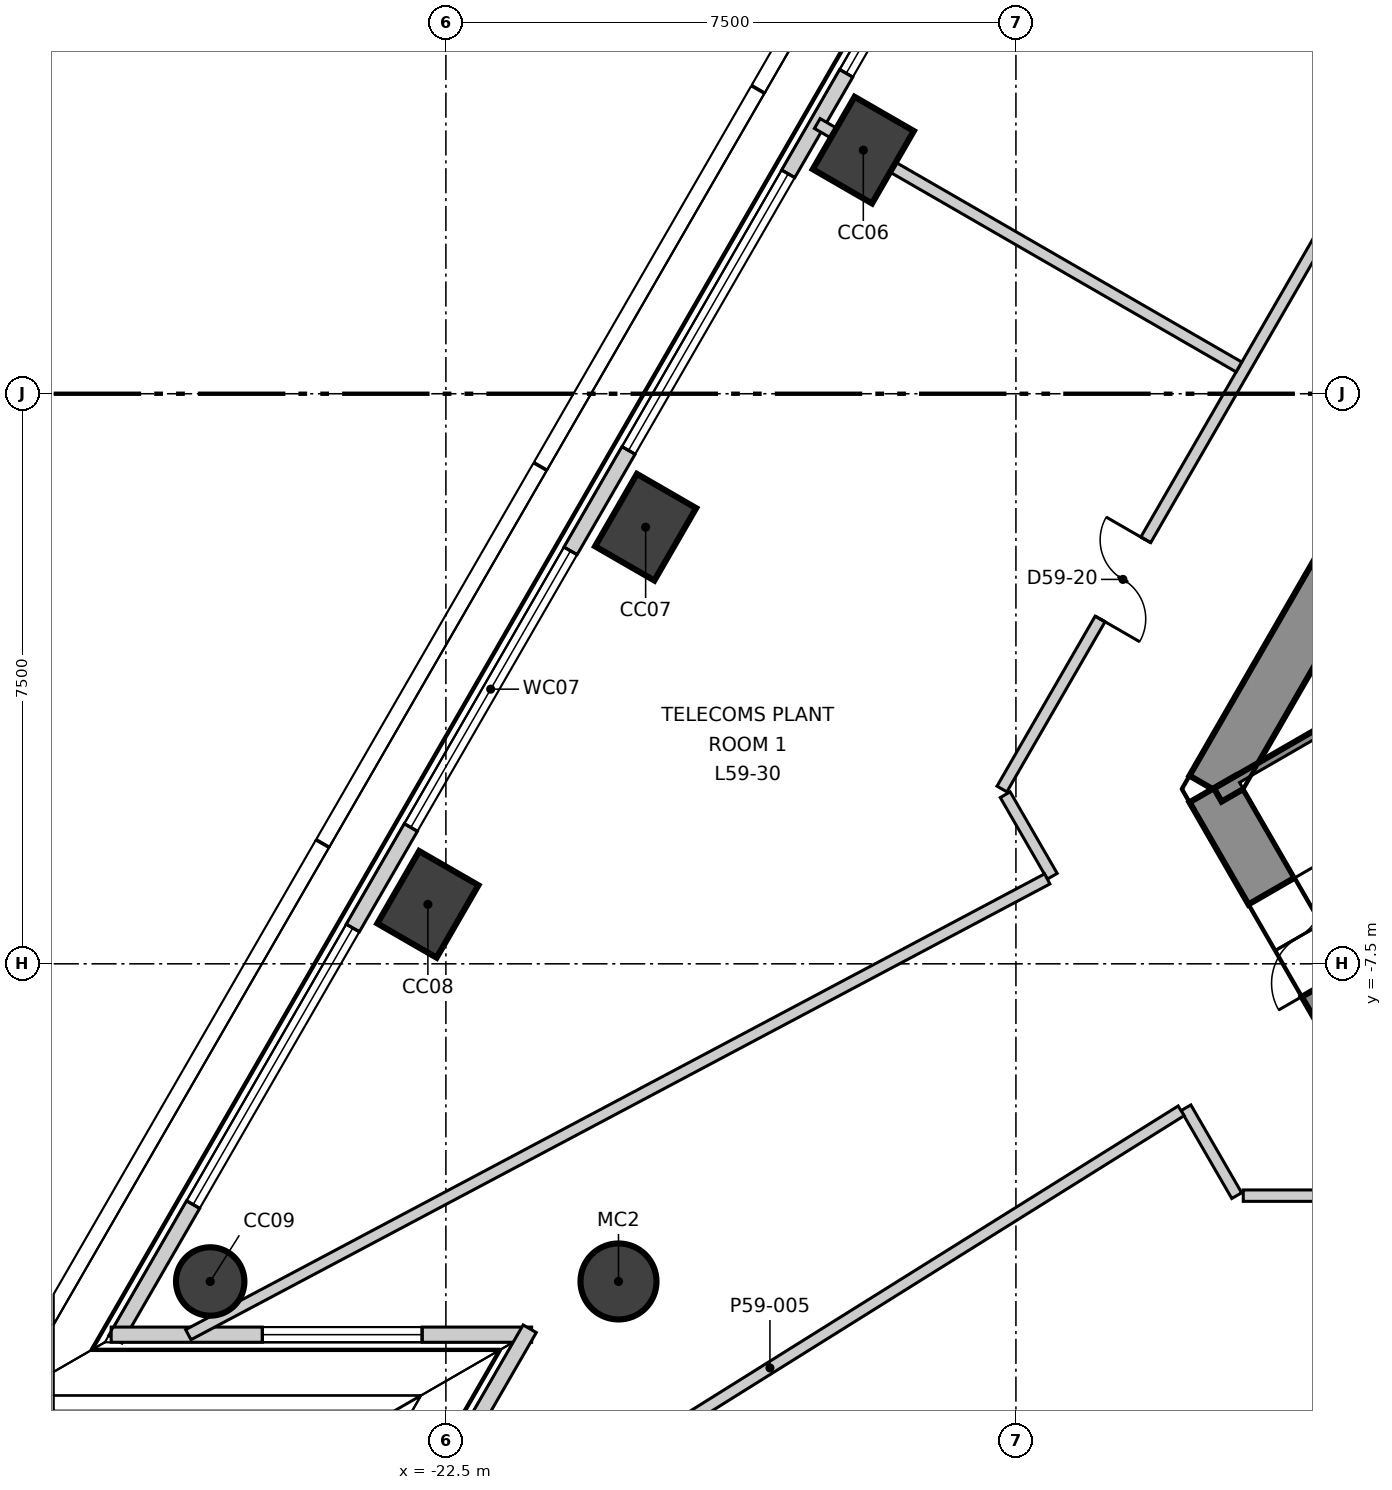
"""IFC4 building model, lengths in metres.
Left out: names, types, materials, properties, quantities, classifications, styles, units other than length and angle.
Written with IfcOpenShell. Run it as: python <this file> out.ifc"""

import sys

from ifc_helpers import new_model, si_unit, direction, frame, frame_2d, origin, origin_2d, place, context, subcontext, project, spatial, polyline, rectangle, circle, outline, extrude, element, fill, save


model = new_model("IFC4")
c1 = context("Model", 3, precision=1e-05, world=origin(), true_north=direction((0.0, 1.0)))
c2 = subcontext(c1, "Body", "Model", "MODEL_VIEW")
j1 = project(units=[si_unit("LENGTHUNIT", "METRE"), si_unit("PLANEANGLEUNIT", "RADIAN")], contexts=[c1])
p1 = place(None, origin())
s1 = spatial("IfcSite", under=j1, at=p1, CompositionType="ELEMENT")
p2 = place(p1, origin())
s2 = spatial("IfcBuilding", under=s1, at=p2, CompositionType="ELEMENT")
p3 = place(p2, frame((0.0, 0.0, 251.3)))
s3 = spatial("IfcBuildingStorey", under=s2, at=p3, CompositionType="ELEMENT", Elevation=251.3)
p4 = place(p3, frame((-1.703, 13.35, -0.3), z_axis=(0.0, 0.0, 1.0), x_axis=(-0.500011533395, -0.866018744874, 0.0)))
e1 = element("IfcWall", 1, at=p4, inside=s3, PredefinedType="SHEAR", context=c2, shape_type="SweptSolid", body=[
    extrude(outline(polyline([(-0.202, -0.35), (1.782, -0.35), (3.766, -0.35), (5.75, -0.35), (7.734, -0.35), (9.718, -0.35), (11.702, -0.35), (13.686, -0.35), (15.67, -0.35), (17.654, -0.35), (19.638, -0.35), (21.622, -0.35), (21.218, 0.35), (19.307, 0.35), (17.397, 0.35), (15.486, 0.35), (13.576, 0.35), (11.665, 0.35), (9.755, 0.35), (7.844, 0.35), (5.934, 0.35), (4.023, 0.35), (2.113, 0.35), (0.202, 0.35), (-0.202, -0.35)])), origin(), (0.0, 0.0, 1.0), 4.2),
])
p5 = place(p4, frame((10.16, 0.0, 0.3)))
e2 = element("IfcOpeningElement", 2, at=p5, cuts=e1, PredefinedType="OPENING", context=c2, shape_type="SweptSolid", body=[
    extrude(rectangle(XDim=1.1, YDim=2.1, at=frame_2d((0.55, 1.05))), frame((0.0, 0.36, 0.0), z_axis=(0.0, -1.0, 0.0), x_axis=(1.0, 0.0, 0.0)), (0.0, 0.0, 1.0), 0.72),
])
p6 = place(p3, frame((-12.413, -5.2, -0.3), z_axis=(0.0, 0.0, 1.0), x_axis=(0.49999337185, -0.866029230515, 0.0)))
e3 = element("IfcWall", 3, at=p6, inside=s3, PredefinedType="SHEAR", context=c2, shape_type="SweptSolid", body=[
    extrude(outline(polyline([(-0.202, -0.35), (1.703, -0.35), (3.608, -0.35), (3.204, 0.35), (1.703, 0.35), (0.202, 0.35), (-0.202, -0.35)])), origin(), (0.0, 0.0, 1.0), 4.2),
])
p7 = place(p6, frame((1.553, 0.0, 0.3)))
e4 = element("IfcOpeningElement", 4, at=p7, cuts=e3, PredefinedType="OPENING", context=c2, shape_type="SweptSolid", body=[
    extrude(rectangle(XDim=1.4, YDim=2.1, at=frame_2d((0.7, 1.05))), frame((0.0, 0.36, 0.0), z_axis=(0.0, -1.0, 0.0), x_axis=(1.0, 0.0, 0.0)), (0.0, 0.0, 1.0), 0.72),
])
for number, where, z_axis, x_axis in (
    (5, (-17.008, 3.205, -0.3), (0.0, 0.0, 1.0), (0.5, 0.866, 0.0)),
    (6, (-19.872, -1.756, -0.3), (0.0, 0.0, 1.0), (0.5, 0.866, 0.0)),
    (7, (-22.737, -6.718, -0.3), (0.0, 0.0, 1.0), (0.5, 0.866, 0.0)),
):
    element("IfcColumn", number, at=place(p3, frame(where, z_axis=z_axis, x_axis=x_axis)), inside=s3, PredefinedType="COLUMN", context=c2, shape_type="SweptSolid", body=[
        extrude(rectangle(XDim=1.1, YDim=0.9, at=origin_2d()), origin(), (0.0, 0.0, 1.0), 4.2),
    ])
p8 = place(p3, frame((-25.601, -11.679, -0.3), z_axis=(0.0, 0.0, 1.0), x_axis=(0.5, 0.866025403784, 0.0)))
e8 = element("IfcColumn", 8, at=p8, inside=s3, PredefinedType="COLUMN", context=c2, shape_type="SweptSolid", body=[
    extrude(circle(Radius=0.45, at=origin_2d()), origin(), (0.0, 0.0, 1.0), 4.2),
])
p9 = place(p3, frame((-20.229, -11.679, -0.3), z_axis=(0.0, 0.0, 1.0), x_axis=(1.0, 0.0, 0.0)))
e9 = element("IfcColumn", 9, at=p9, inside=s3, PredefinedType="COLUMN", context=c2, shape_type="SweptSolid", body=[
    extrude(circle(Radius=0.5, at=origin_2d()), origin(), (0.0, 0.0, 1.0), 4.2),
])
p10 = place(p3, frame((-2.641, 29.489, 0.0), z_axis=(0.0, 0.0, 1.0), x_axis=(-0.500004868955, -0.866022592674, 0.0)))
e10 = element("IfcWall", 10, at=p10, inside=s3, PredefinedType="ELEMENTEDWALL", context=c2, shape_type="SweptSolid", body=[
    extrude(rectangle(XDim=48.416, YDim=0.2, at=frame_2d((24.208, 0.0))), origin(), (0.0, 0.0, 1.0), 3.9),
])
p11 = place(p10, frame((2.067, 0.0, 0.9)))
e11 = element("IfcOpeningElement", 11, at=p11, cuts=e10, PredefinedType="OPENING", context=c2, shape_type="SweptSolid", body=[
    extrude(rectangle(XDim=4.2, YDim=2.5, at=frame_2d((2.1, 1.25))), frame((0.0, 0.11, 0.0), z_axis=(0.0, -1.0, 0.0), x_axis=(1.0, 0.0, 0.0)), (0.0, 0.0, 1.0), 0.22),
])
p12 = place(p10, frame((7.796, 0.0, 0.9)))
e12 = element("IfcOpeningElement", 12, at=p12, cuts=e10, PredefinedType="OPENING", context=c2, shape_type="SweptSolid", body=[
    extrude(rectangle(XDim=4.2, YDim=2.5, at=frame_2d((2.1, 1.25))), frame((0.0, 0.11, 0.0), z_axis=(0.0, -1.0, 0.0), x_axis=(1.0, 0.0, 0.0)), (0.0, 0.0, 1.0), 0.22),
])
p13 = place(p10, frame((13.524, 0.0, 0.9)))
e13 = element("IfcOpeningElement", 13, at=p13, cuts=e10, PredefinedType="OPENING", context=c2, shape_type="SweptSolid", body=[
    extrude(rectangle(XDim=4.2, YDim=2.5, at=frame_2d((2.1, 1.25))), frame((0.0, 0.11, 0.0), z_axis=(0.0, -1.0, 0.0), x_axis=(1.0, 0.0, 0.0)), (0.0, 0.0, 1.0), 0.22),
])
p14 = place(p10, frame((19.253, 0.0, 0.9)))
e14 = element("IfcOpeningElement", 14, at=p14, cuts=e10, PredefinedType="OPENING", context=c2, shape_type="SweptSolid", body=[
    extrude(rectangle(XDim=4.2, YDim=2.5, at=frame_2d((2.1, 1.25))), frame((0.0, 0.11, 0.0), z_axis=(0.0, -1.0, 0.0), x_axis=(1.0, 0.0, 0.0)), (0.0, 0.0, 1.0), 0.22),
])
p15 = place(p10, frame((24.982, 0.0, 0.9)))
e15 = element("IfcOpeningElement", 15, at=p15, cuts=e10, PredefinedType="OPENING", context=c2, shape_type="SweptSolid", body=[
    extrude(rectangle(XDim=4.2, YDim=2.5, at=frame_2d((2.1, 1.25))), frame((0.0, 0.11, 0.0), z_axis=(0.0, -1.0, 0.0), x_axis=(1.0, 0.0, 0.0)), (0.0, 0.0, 1.0), 0.22),
])
p16 = place(p10, frame((30.711, 0.0, 0.9)))
e16 = element("IfcOpeningElement", 16, at=p16, cuts=e10, PredefinedType="OPENING", context=c2, shape_type="SweptSolid", body=[
    extrude(rectangle(XDim=4.2, YDim=2.5, at=frame_2d((2.1, 1.25))), frame((0.0, 0.11, 0.0), z_axis=(0.0, -1.0, 0.0), x_axis=(1.0, 0.0, 0.0)), (0.0, 0.0, 1.0), 0.22),
])
p17 = place(p10, frame((36.439, 0.0, 0.9)))
e17 = element("IfcOpeningElement", 17, at=p17, cuts=e10, PredefinedType="OPENING", context=c2, shape_type="SweptSolid", body=[
    extrude(rectangle(XDim=4.2, YDim=2.5, at=frame_2d((2.1, 1.25))), frame((0.0, 0.11, 0.0), z_axis=(0.0, -1.0, 0.0), x_axis=(1.0, 0.0, 0.0)), (0.0, 0.0, 1.0), 0.22),
])
p18 = place(p10, frame((42.168, 0.0, 0.9)))
e18 = element("IfcOpeningElement", 18, at=p18, cuts=e10, PredefinedType="OPENING", context=c2, shape_type="SweptSolid", body=[
    extrude(rectangle(XDim=4.2, YDim=2.5, at=frame_2d((2.1, 1.25))), frame((0.0, 0.11, 0.0), z_axis=(0.0, -1.0, 0.0), x_axis=(1.0, 0.0, 0.0)), (0.0, 0.0, 1.0), 0.22),
])
p19 = place(p3, frame((-26.904, -12.379, 0.0), z_axis=(0.0, 0.0, 1.0), x_axis=(1.0, 0.0, 0.0)))
e19 = element("IfcWall", 19, at=p19, inside=s3, PredefinedType="ELEMENTEDWALL", context=c2, shape_type="SweptSolid", body=[
    extrude(rectangle(XDim=5.532, YDim=0.2, at=frame_2d((2.766, 0.0))), origin(), (0.0, 0.0, 1.0), 3.9),
])
p20 = place(p19, frame((1.99, 0.0, 0.9)))
e20 = element("IfcOpeningElement", 20, at=p20, cuts=e19, PredefinedType="OPENING", context=c2, shape_type="SweptSolid", body=[
    extrude(rectangle(XDim=2.1, YDim=2.5, at=frame_2d((1.05, 1.25))), frame((0.0, 0.11, 0.0), z_axis=(0.0, -1.0, 0.0), x_axis=(1.0, 0.0, 0.0)), (0.0, 0.0, 1.0), 0.22),
])
p21 = place(p3, frame((-21.397, -12.301, 0.0), z_axis=(0.0, 0.0, 1.0), x_axis=(-0.499926164748, -0.866068028391, 0.0)))
e21 = element("IfcWall", 21, at=p21, inside=s3, PredefinedType="ELEMENTEDWALL", context=c2, shape_type="SweptSolid", body=[
    extrude(rectangle(XDim=5.533, YDim=0.2, at=frame_2d((2.767, 0.0))), origin(), (0.0, 0.0, 1.0), 3.9),
])
p22 = place(p21, frame((1.39, 0.0, 0.9)))
e22 = element("IfcOpeningElement", 22, at=p22, cuts=e21, PredefinedType="OPENING", context=c2, shape_type="SweptSolid", body=[
    extrude(rectangle(XDim=2.1, YDim=2.5, at=frame_2d((1.05, 1.25))), frame((0.0, 0.11, 0.0), z_axis=(0.0, -1.0, 0.0), x_axis=(1.0, 0.0, 0.0)), (0.0, 0.0, 1.0), 0.22),
])
p23 = place(p3, frame((-15.184, -5.2, 0.0), z_axis=(0.0, 0.0, 1.0), x_axis=(0.499984831513, 0.866034161138, 0.0)))
e23 = element("IfcWall", 23, at=p23, inside=s3, PredefinedType="PARTITIONING", context=c2, shape_type="SweptSolid", body=[
    extrude(rectangle(XDim=24.191, YDim=0.15, at=frame_2d((12.095, 0.0))), origin(), (0.0, 0.0, 1.0), 3.9),
])
p24 = place(p23, frame((20.408, 0.0, 0.0)))
e24 = element("IfcOpeningElement", 24, at=p24, cuts=e23, PredefinedType="OPENING", context=c2, shape_type="SweptSolid", body=[
    extrude(rectangle(XDim=1.2, YDim=2.1, at=frame_2d((0.6, 1.05))), frame((0.0, 0.085, 0.0), z_axis=(0.0, -1.0, 0.0), x_axis=(1.0, 0.0, 0.0)), (0.0, 0.0, 1.0), 0.17),
])
p25 = place(p23, frame((11.596, 0.0, 0.0)))
e25 = element("IfcOpeningElement", 25, at=p25, cuts=e23, PredefinedType="OPENING", context=c2, shape_type="SweptSolid", body=[
    extrude(rectangle(XDim=1.0, YDim=2.1, at=frame_2d((0.5, 1.05))), frame((0.0, 0.085, 0.0), z_axis=(0.0, -1.0, 0.0), x_axis=(1.0, 0.0, 0.0)), (0.0, 0.0, 1.0), 0.17),
])
p26 = place(p23, frame((2.584, 0.0, 0.0)))
e26 = element("IfcOpeningElement", 26, at=p26, cuts=e23, PredefinedType="OPENING", context=c2, shape_type="SweptSolid", body=[
    extrude(rectangle(XDim=1.2, YDim=2.1, at=frame_2d((0.6, 1.05))), frame((0.0, 0.085, 0.0), z_axis=(0.0, -1.0, 0.0), x_axis=(1.0, 0.0, 0.0)), (0.0, 0.0, 1.0), 0.17),
])
p27 = place(p3, frame((-15.141, -5.275, 0.0), z_axis=(0.0, 0.0, 1.0), x_axis=(0.499785009086, -0.86614949327, 0.0)))
e27 = element("IfcWall", 27, at=p27, inside=s3, PredefinedType="PARTITIONING", context=c2, shape_type="SweptSolid", body=[
    extrude(rectangle(XDim=1.239, YDim=0.15, at=frame_2d((0.619, 0.0))), origin(), (0.0, 0.0, 1.0), 3.9),
])
p28 = place(p3, frame((-12.763, -9.394, 0.0), z_axis=(0.0, 0.0, 1.0), x_axis=(0.500308063137, -0.865847470378, 0.0)))
e28 = element("IfcWall", 28, at=p28, inside=s3, PredefinedType="PARTITIONING", context=c2, shape_type="SweptSolid", body=[
    extrude(rectangle(XDim=1.335, YDim=0.15, at=frame_2d((0.667, 0.0))), origin(), (0.0, 0.0, 1.0), 3.9),
])
p29 = place(p3, frame((-25.889, -12.379, 0.0), z_axis=(0.0, 0.0, 1.0), x_axis=(0.88336885413, 0.468678426593, 0.0)))
e29 = element("IfcWall", 29, at=p29, inside=s3, PredefinedType="PARTITIONING", context=c2, shape_type="SweptSolid", body=[
    extrude(rectangle(XDim=12.793, YDim=0.15, at=frame_2d((6.396, 0.0))), origin(), (0.0, 0.0, 1.0), 3.3),
])
p30 = place(p3, frame((-23.647, -16.199, 0.0), z_axis=(0.0, 0.0, 1.0), x_axis=(0.847937036603, 0.530096955243, 0.0)))
e30 = element("IfcWall", 30, at=p30, inside=s3, PredefinedType="PARTITIONING", context=c2, shape_type="SweptSolid", body=[
    extrude(rectangle(XDim=12.762, YDim=0.15, at=frame_2d((6.381, 0.0))), origin(), (0.0, 0.0, 1.0), 3.3),
])
p31 = place(p3, frame((-12.009, -10.55, 0.0), z_axis=(0.0, 0.0, 1.0), x_axis=(1.0, 0.0, 0.0)))
e31 = element("IfcWall", 31, at=p31, inside=s3, PredefinedType="PARTITIONING", context=c2, shape_type="SweptSolid", body=[
    extrude(rectangle(XDim=24.104, YDim=0.15, at=frame_2d((12.052, 0.0))), origin(), (0.0, 0.0, 1.0), 3.9),
])
p32 = place(p31, frame((2.497, 0.0, 0.0)))
e32 = element("IfcOpeningElement", 32, at=p32, cuts=e31, PredefinedType="OPENING", context=c2, shape_type="SweptSolid", body=[
    extrude(rectangle(XDim=1.2, YDim=2.1, at=frame_2d((0.6, 1.05))), frame((0.0, 0.085, 0.0), z_axis=(0.0, -1.0, 0.0), x_axis=(1.0, 0.0, 0.0)), (0.0, 0.0, 1.0), 0.17),
])
p33 = place(p31, frame((8.644, 0.0, 0.0)))
e33 = element("IfcOpeningElement", 33, at=p33, cuts=e31, PredefinedType="OPENING", context=c2, shape_type="SweptSolid", body=[
    extrude(rectangle(XDim=1.0, YDim=2.1, at=frame_2d((0.5, 1.05))), frame((0.0, 0.085, 0.0), z_axis=(0.0, -1.0, 0.0), x_axis=(1.0, 0.0, 0.0)), (0.0, 0.0, 1.0), 0.17),
])
p34 = place(p31, frame((14.373, 0.0, 0.0)))
e34 = element("IfcOpeningElement", 34, at=p34, cuts=e31, PredefinedType="OPENING", context=c2, shape_type="SweptSolid", body=[
    extrude(rectangle(XDim=1.0, YDim=2.1, at=frame_2d((0.5, 1.05))), frame((0.0, 0.085, 0.0), z_axis=(0.0, -1.0, 0.0), x_axis=(1.0, 0.0, 0.0)), (0.0, 0.0, 1.0), 0.17),
])
p35 = place(p31, frame((20.321, 0.0, 0.0)))
e35 = element("IfcOpeningElement", 35, at=p35, cuts=e31, PredefinedType="OPENING", context=c2, shape_type="SweptSolid", body=[
    extrude(rectangle(XDim=1.2, YDim=2.1, at=frame_2d((0.6, 1.05))), frame((0.0, 0.085, 0.0), z_axis=(0.0, -1.0, 0.0), x_axis=(1.0, 0.0, 0.0)), (0.0, 0.0, 1.0), 0.17),
])
p36 = place(p3, frame((-17.614, 3.555, 0.0), z_axis=(0.0, 0.0, 1.0), x_axis=(0.866046605956, -0.499963274963, 0.0)))
e36 = element("IfcWall", 36, at=p36, inside=s3, PredefinedType="PARTITIONING", context=c2, shape_type="SweptSolid", body=[
    extrude(rectangle(XDim=6.406, YDim=0.15, at=frame_2d((3.203, 0.0))), origin(), (0.0, 0.0, 1.0), 3.9),
])
p37 = place(p3, frame((-12.344, -5.279, 0.0), z_axis=(0.0, 0.0, 1.0), x_axis=(0.866046323291, 0.499963764601, 0.0)))
e37 = element("IfcWall", 37, at=p37, inside=s3, PredefinedType="SOLIDWALL", context=c2, shape_type="SweptSolid", body=[
    extrude(rectangle(XDim=6.714, YDim=0.2, at=frame_2d((3.357, 0.0))), origin(), (0.0, 0.0, 1.0), 3.9),
])
p38 = place(p15, origin())
e38 = element("IfcWindow", 38, at=p38, inside=s3, PartitioningType="SINGLE_PANEL", PredefinedType="WINDOW", context=c2, shape_type="SweptSolid", body=[
    extrude(rectangle(XDim=4.2, YDim=2.5, at=frame_2d((2.1, 1.25))), frame((0.0, 0.03, 0.0), z_axis=(0.0, -1.0, 0.0), x_axis=(1.0, 0.0, 0.0)), (0.0, 0.0, 1.0), 0.06),
])
fill(e15, e38)
p39 = place(p16, origin())
e39 = element("IfcWindow", 39, at=p39, inside=s3, PartitioningType="SINGLE_PANEL", PredefinedType="WINDOW", context=c2, shape_type="SweptSolid", body=[
    extrude(rectangle(XDim=4.2, YDim=2.5, at=frame_2d((2.1, 1.25))), frame((0.0, 0.03, 0.0), z_axis=(0.0, -1.0, 0.0), x_axis=(1.0, 0.0, 0.0)), (0.0, 0.0, 1.0), 0.06),
])
fill(e16, e39)
p40 = place(p17, origin())
e40 = element("IfcWindow", 40, at=p40, inside=s3, PartitioningType="SINGLE_PANEL", PredefinedType="WINDOW", context=c2, shape_type="SweptSolid", body=[
    extrude(rectangle(XDim=4.2, YDim=2.5, at=frame_2d((2.1, 1.25))), frame((0.0, 0.03, 0.0), z_axis=(0.0, -1.0, 0.0), x_axis=(1.0, 0.0, 0.0)), (0.0, 0.0, 1.0), 0.06),
])
fill(e17, e40)
p41 = place(p18, origin())
e41 = element("IfcWindow", 41, at=p41, inside=s3, PartitioningType="SINGLE_PANEL", PredefinedType="WINDOW", context=c2, shape_type="SweptSolid", body=[
    extrude(rectangle(XDim=4.2, YDim=2.5, at=frame_2d((2.1, 1.25))), frame((0.0, 0.03, 0.0), z_axis=(0.0, -1.0, 0.0), x_axis=(1.0, 0.0, 0.0)), (0.0, 0.0, 1.0), 0.06),
])
fill(e18, e41)
p42 = place(p20, origin())
e42 = element("IfcWindow", 42, at=p42, inside=s3, PartitioningType="SINGLE_PANEL", PredefinedType="WINDOW", context=c2, shape_type="SweptSolid", body=[
    extrude(rectangle(XDim=2.1, YDim=2.5, at=frame_2d((1.05, 1.25))), frame((0.0, 0.03, 0.0), z_axis=(0.0, -1.0, 0.0), x_axis=(1.0, 0.0, 0.0)), (0.0, 0.0, 1.0), 0.06),
])
fill(e20, e42)
p43 = place(p26, origin())
e43 = element("IfcDoor", 43, at=p43, inside=s3, OperationType="DOUBLE_DOOR_SINGLE_SWING", PredefinedType="DOOR", context=c2, shape_type="SweptSolid", body=[
    extrude(rectangle(XDim=1.2, YDim=2.1, at=frame_2d((0.6, 1.05))), frame((0.0, 0.025, 0.0), z_axis=(0.0, -1.0, 0.0), x_axis=(1.0, 0.0, 0.0)), (0.0, 0.0, 1.0), 0.05),
])
fill(e26, e43)
p44 = place(p7, origin())
e44 = element("IfcDoor", 44, at=p44, inside=s3, OperationType="DOUBLE_DOOR_SINGLE_SWING", PredefinedType="DOOR", context=c2, shape_type="SweptSolid", body=[
    extrude(rectangle(XDim=1.4, YDim=2.1, at=frame_2d((0.7, 1.05))), frame((0.0, 0.025, 0.0), z_axis=(0.0, -1.0, 0.0), x_axis=(1.0, 0.0, 0.0)), (0.0, 0.0, 1.0), 0.05),
])
fill(e4, e44)
save(model, sys.argv[1])
